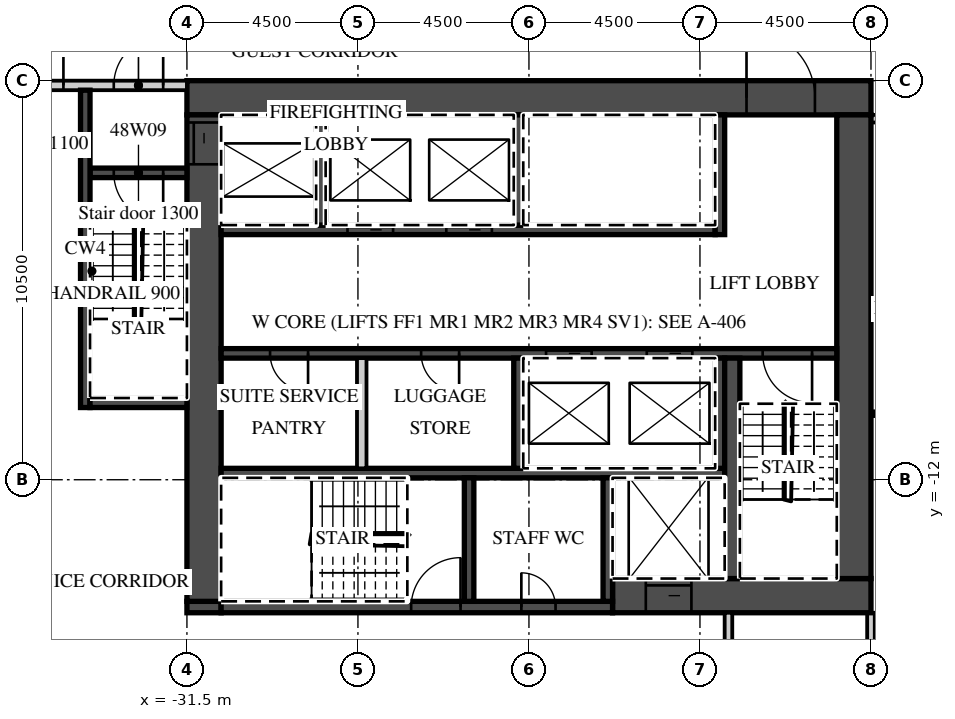
"""IFC4 building model, lengths in metres.
Left out: names, types, materials, properties, quantities, classifications, styles, units other than length and angle.
Written with IfcOpenShell. Run it as: python <this file> out.ifc"""

import sys

from ifc_helpers import new_model, si_unit, direction, frame, frame_2d, origin, place, context, subcontext, project, spatial, rectangle, extrude, element, fill, save


model = new_model("IFC4")
c1 = context("Model", 3, precision=1e-05, world=origin(), true_north=direction((0.0, 1.0)))
c2 = subcontext(c1, "Body", "Model", "MODEL_VIEW")
j1 = project(units=[si_unit("LENGTHUNIT", "METRE"), si_unit("PLANEANGLEUNIT", "RADIAN")], contexts=[c1])
p1 = place(None, origin())
s1 = spatial("IfcSite", under=j1, at=p1, CompositionType="ELEMENT")
p2 = place(p1, origin())
s2 = spatial("IfcBuilding", under=s1, at=p2, CompositionType="ELEMENT")
p3 = place(p2, frame((0.0, 0.0, 199.9)))
s3 = spatial("IfcBuildingStorey", under=s2, at=p3, CompositionType="ELEMENT", Elevation=199.9)
p4 = place(p3, frame((-13.5, -22.3, 0.0), z_axis=(0.0, 0.0, 1.0), x_axis=(0.0, 1.0, 0.0)))
e1 = element("IfcWall", 1, at=p4, inside=s3, PredefinedType="PARTITIONING", context=c2, shape_type="SweptSolid", body=[
    extrude(rectangle(XDim=6.8, YDim=0.2, at=frame_2d((3.4, 0.0))), origin(), (0.0, 0.0, 1.0), 3.02),
])
p5 = place(p3, frame((-13.5, -2.5, 0.0), z_axis=(0.0, 0.0, 1.0), x_axis=(1.0, 0.0, 0.0)))
e2 = element("IfcWall", 2, at=p5, inside=s3, PredefinedType="PARTITIONING", context=c2, shape_type="SweptSolid", body=[
    extrude(rectangle(XDim=27.0, YDim=0.2, at=frame_2d((13.5, 0.0))), origin(), (0.0, 0.0, 1.0), 3.02),
])
p6 = place(p5, frame((2.925, 0.0, 0.0)))
e3 = element("IfcOpeningElement", 3, at=p6, cuts=e2, PredefinedType="OPENING", context=c2, shape_type="SweptSolid", body=[
    extrude(rectangle(XDim=1.0, YDim=2.1, at=frame_2d((0.5, 1.05))), frame((0.0, 0.11, 0.0), z_axis=(0.0, -1.0, 0.0), x_axis=(1.0, 0.0, 0.0)), (0.0, 0.0, 1.0), 0.22),
])
p7 = place(p5, frame((5.075, 0.0, 0.0)))
e4 = element("IfcOpeningElement", 4, at=p7, cuts=e2, PredefinedType="OPENING", context=c2, shape_type="SweptSolid", body=[
    extrude(rectangle(XDim=1.0, YDim=2.1, at=frame_2d((0.5, 1.05))), frame((0.0, 0.11, 0.0), z_axis=(0.0, -1.0, 0.0), x_axis=(1.0, 0.0, 0.0)), (0.0, 0.0, 1.0), 0.22),
])
p8 = place(p5, frame((11.925, 0.0, 0.0)))
e5 = element("IfcOpeningElement", 5, at=p8, cuts=e2, PredefinedType="OPENING", context=c2, shape_type="SweptSolid", body=[
    extrude(rectangle(XDim=1.0, YDim=2.1, at=frame_2d((0.5, 1.05))), frame((0.0, 0.11, 0.0), z_axis=(0.0, -1.0, 0.0), x_axis=(1.0, 0.0, 0.0)), (0.0, 0.0, 1.0), 0.22),
])
p9 = place(p5, frame((15.938, 0.0, 0.0)))
e6 = element("IfcOpeningElement", 6, at=p9, cuts=e2, PredefinedType="OPENING", context=c2, shape_type="SweptSolid", body=[
    extrude(rectangle(XDim=1.2, YDim=2.1, at=frame_2d((0.6, 1.05))), frame((0.0, 0.11, 0.0), z_axis=(0.0, -1.0, 0.0), x_axis=(1.0, 0.0, 0.0)), (0.0, 0.0, 1.0), 0.22),
])
p10 = place(p5, frame((25.425, 0.0, 0.0)))
e7 = element("IfcOpeningElement", 7, at=p10, cuts=e2, PredefinedType="OPENING", context=c2, shape_type="SweptSolid", body=[
    extrude(rectangle(XDim=1.0, YDim=2.1, at=frame_2d((0.5, 1.05))), frame((0.0, 0.11, 0.0), z_axis=(0.0, -1.0, 0.0), x_axis=(1.0, 0.0, 0.0)), (0.0, 0.0, 1.0), 0.22),
])
p11 = place(p3, frame((-31.5, -1.95, 0.0), z_axis=(0.0, 0.0, 1.0), x_axis=(1.0, 0.0, 0.0)))
e8 = element("IfcWall", 8, at=p11, inside=s3, PredefinedType="SHEAR", context=c2, shape_type="SweptSolid", body=[
    extrude(rectangle(XDim=18.0, YDim=0.9, at=frame_2d((9.0, 0.0))), origin(), (0.0, 0.0, 1.0), 3.02),
])
p12 = place(p11, frame((14.725, 0.0, 0.0)))
e9 = element("IfcOpeningElement", 9, at=p12, cuts=e8, PredefinedType="OPENING", context=c2, shape_type="SweptSolid", body=[
    extrude(rectangle(XDim=1.8, YDim=2.1, at=frame_2d((0.9, 1.05))), frame((0.0, 0.46, 0.0), z_axis=(0.0, -1.0, 0.0), x_axis=(1.0, 0.0, 0.0)), (0.0, 0.0, 1.0), 0.92),
])
p13 = place(p3, frame((-20.3, -15.05, 0.0), z_axis=(0.0, 0.0, 1.0), x_axis=(1.0, 0.0, 0.0)))
e10 = element("IfcWall", 10, at=p13, inside=s3, PredefinedType="SHEAR", context=c2, shape_type="SweptSolid", body=[
    extrude(rectangle(XDim=6.8, YDim=0.9, at=frame_2d((3.4, 0.0))), origin(), (0.0, 0.0, 1.0), 3.02),
])
p14 = place(p13, frame((0.875, 0.0, 0.0)))
e11 = element("IfcOpeningElement", 11, at=p14, cuts=e10, PredefinedType="OPENING", context=c2, shape_type="SweptSolid", body=[
    extrude(rectangle(XDim=1.2, YDim=2.1, at=frame_2d((0.6, 1.05))), frame((0.0, 0.46, 0.0), z_axis=(0.0, -1.0, 0.0), x_axis=(1.0, 0.0, 0.0)), (0.0, 0.0, 1.0), 0.92),
])
p15 = place(p3, frame((-31.5, -15.35, 0.0), z_axis=(0.0, 0.0, 1.0), x_axis=(1.0, 0.0, 0.0)))
e12 = element("IfcWall", 12, at=p15, inside=s3, PredefinedType="SHEAR", context=c2, shape_type="SweptSolid", body=[
    extrude(rectangle(XDim=0.9, YDim=0.3, at=frame_2d((0.45, 0.0))), origin(), (0.0, 0.0, 1.0), 3.02),
])
p16 = place(p3, frame((-30.6, -15.35, 0.0), z_axis=(0.0, 0.0, 1.0), x_axis=(1.0, 0.0, 0.0)))
e13 = element("IfcWall", 13, at=p16, inside=s3, PredefinedType="SHEAR", context=c2, shape_type="SweptSolid", body=[
    extrude(rectangle(XDim=10.3, YDim=0.3, at=frame_2d((5.15, 0.0))), origin(), (0.0, 0.0, 1.0), 3.02),
])
p17 = place(p16, frame((5.0, 0.0, 0.0)))
e14 = element("IfcOpeningElement", 14, at=p17, cuts=e13, PredefinedType="OPENING", context=c2, shape_type="SweptSolid", body=[
    extrude(rectangle(XDim=1.3, YDim=2.1, at=frame_2d((0.65, 1.05))), frame((0.0, 0.16, 0.0), z_axis=(0.0, -1.0, 0.0), x_axis=(1.0, 0.0, 0.0)), (0.0, 0.0, 1.0), 0.32),
])
p18 = place(p16, frame((7.9, 0.0, 0.0)))
e15 = element("IfcOpeningElement", 15, at=p18, cuts=e13, PredefinedType="OPENING", context=c2, shape_type="SweptSolid", body=[
    extrude(rectangle(XDim=0.9, YDim=2.1, at=frame_2d((0.45, 1.05))), frame((0.0, 0.16, 0.0), z_axis=(0.0, -1.0, 0.0), x_axis=(1.0, 0.0, 0.0)), (0.0, 0.0, 1.0), 0.32),
])
p19 = place(p3, frame((-31.05, -15.2, 0.0), z_axis=(0.0, 0.0, 1.0), x_axis=(0.0, 1.0, 0.0)))
e16 = element("IfcWall", 16, at=p19, inside=s3, PredefinedType="SHEAR", context=c2, shape_type="SweptSolid", body=[
    extrude(rectangle(XDim=12.8, YDim=0.9, at=frame_2d((6.4, 0.0))), origin(), (0.0, 0.0, 1.0), 3.02),
])
p20 = place(p19, frame((11.5, 0.0, 0.0)))
e17 = element("IfcOpeningElement", 17, at=p20, cuts=e16, PredefinedType="OPENING", context=c2, shape_type="SweptSolid", body=[
    extrude(rectangle(XDim=1.1, YDim=2.1, at=frame_2d((0.55, 1.05))), frame((0.0, 0.46, 0.0), z_axis=(0.0, -1.0, 0.0), x_axis=(1.0, 0.0, 0.0)), (0.0, 0.0, 1.0), 0.92),
])
p21 = place(p3, frame((-13.95, -14.6, 0.0), z_axis=(0.0, 0.0, 1.0), x_axis=(0.0, 1.0, 0.0)))
e18 = element("IfcWall", 18, at=p21, inside=s3, PredefinedType="SHEAR", context=c2, shape_type="SweptSolid", body=[
    extrude(rectangle(XDim=12.2, YDim=0.9, at=frame_2d((6.1, 0.0))), origin(), (0.0, 0.0, 1.0), 3.02),
])
p22 = place(p3, frame((-30.6, -5.425, 0.0), z_axis=(0.0, 0.0, 1.0), x_axis=(1.0, 0.0, 0.0)))
e19 = element("IfcWall", 19, at=p22, inside=s3, PredefinedType="SHEAR", context=c2, shape_type="SweptSolid", body=[
    extrude(rectangle(XDim=13.0, YDim=0.25, at=frame_2d((6.5, 0.0))), origin(), (0.0, 0.0, 1.0), 3.02),
])
p23 = place(p22, frame((3.325, 0.0, 0.0)))
e20 = element("IfcOpeningElement", 20, at=p23, cuts=e19, PredefinedType="OPENING", context=c2, shape_type="SweptSolid", body=[
    extrude(rectangle(XDim=1.2, YDim=2.1, at=frame_2d((0.6, 1.05))), frame((0.0, 0.135, 0.0), z_axis=(0.0, -1.0, 0.0), x_axis=(1.0, 0.0, 0.0)), (0.0, 0.0, 1.0), 0.27),
])
p24 = place(p22, frame((5.925, 0.0, 0.0)))
e21 = element("IfcOpeningElement", 21, at=p24, cuts=e19, PredefinedType="OPENING", context=c2, shape_type="SweptSolid", body=[
    extrude(rectangle(XDim=1.2, YDim=2.1, at=frame_2d((0.6, 1.05))), frame((0.0, 0.135, 0.0), z_axis=(0.0, -1.0, 0.0), x_axis=(1.0, 0.0, 0.0)), (0.0, 0.0, 1.0), 0.27),
])
p25 = place(p3, frame((-17.475, -5.55, 0.0), z_axis=(0.0, 0.0, 1.0), x_axis=(0.0, 1.0, 0.0)))
e22 = element("IfcWall", 22, at=p25, inside=s3, PredefinedType="SHEAR", context=c2, shape_type="SweptSolid", body=[
    extrude(rectangle(XDim=3.15, YDim=0.25, at=frame_2d((1.575, 0.0))), origin(), (0.0, 0.0, 1.0), 3.02),
])
for number, where, z_axis, x_axis in (
    (23, (-27.975, -5.3, 0.0), (0.0, 0.0, 1.0), (0.0, 1.0, 0.0)),
    (24, (-22.775, -5.3, 0.0), (0.0, 0.0, 1.0), (0.0, 1.0, 0.0)),
):
    element("IfcWall", number, at=place(p3, frame(where, z_axis=z_axis, x_axis=x_axis)), inside=s3, PredefinedType="SHEAR", context=c2, shape_type="SweptSolid", body=[
        extrude(rectangle(XDim=2.9, YDim=0.25, at=frame_2d((1.45, 0.0))), origin(), (0.0, 0.0, 1.0), 3.02),
    ])
p26 = place(p3, frame((-30.6, -8.675, 0.0), z_axis=(0.0, 0.0, 1.0), x_axis=(1.0, 0.0, 0.0)))
e25 = element("IfcWall", 25, at=p26, inside=s3, PredefinedType="SHEAR", context=c2, shape_type="SweptSolid", body=[
    extrude(rectangle(XDim=16.2, YDim=0.25, at=frame_2d((8.1, 0.0))), origin(), (0.0, 0.0, 1.0), 3.02),
])
p27 = place(p26, frame((8.55, 0.0, 0.0)))
e26 = element("IfcOpeningElement", 26, at=p27, cuts=e25, PredefinedType="OPENING", context=c2, shape_type="SweptSolid", body=[
    extrude(rectangle(XDim=1.2, YDim=2.1, at=frame_2d((0.6, 1.05))), frame((0.0, 0.135, 0.0), z_axis=(0.0, -1.0, 0.0), x_axis=(1.0, 0.0, 0.0)), (0.0, 0.0, 1.0), 0.27),
])
p28 = place(p26, frame((11.2, 0.0, 0.0)))
e27 = element("IfcOpeningElement", 27, at=p28, cuts=e25, PredefinedType="OPENING", context=c2, shape_type="SweptSolid", body=[
    extrude(rectangle(XDim=1.2, YDim=2.1, at=frame_2d((0.6, 1.05))), frame((0.0, 0.135, 0.0), z_axis=(0.0, -1.0, 0.0), x_axis=(1.0, 0.0, 0.0)), (0.0, 0.0, 1.0), 0.27),
])
p29 = place(p26, frame((14.25, 0.0, 0.0)))
e28 = element("IfcOpeningElement", 28, at=p29, cuts=e25, PredefinedType="OPENING", context=c2, shape_type="SweptSolid", body=[
    extrude(rectangle(XDim=1.3, YDim=2.1, at=frame_2d((0.65, 1.05))), frame((0.0, 0.135, 0.0), z_axis=(0.0, -1.0, 0.0), x_axis=(1.0, 0.0, 0.0)), (0.0, 0.0, 1.0), 0.27),
])
p30 = place(p26, frame((1.288, 0.0, 0.0)))
e29 = element("IfcOpeningElement", 29, at=p30, cuts=e25, PredefinedType="OPENING", context=c2, shape_type="SweptSolid", body=[
    extrude(rectangle(XDim=1.0, YDim=2.1, at=frame_2d((0.5, 1.05))), frame((0.0, 0.135, 0.0), z_axis=(0.0, -1.0, 0.0), x_axis=(1.0, 0.0, 0.0)), (0.0, 0.0, 1.0), 0.27),
])
p31 = place(p26, frame((5.262, 0.0, 0.0)))
e30 = element("IfcOpeningElement", 30, at=p31, cuts=e25, PredefinedType="OPENING", context=c2, shape_type="SweptSolid", body=[
    extrude(rectangle(XDim=1.0, YDim=2.1, at=frame_2d((0.5, 1.05))), frame((0.0, 0.135, 0.0), z_axis=(0.0, -1.0, 0.0), x_axis=(1.0, 0.0, 0.0)), (0.0, 0.0, 1.0), 0.27),
])
p32 = place(p3, frame((-30.6, -11.825, 0.0), z_axis=(0.0, 0.0, 1.0), x_axis=(1.0, 0.0, 0.0)))
e31 = element("IfcWall", 31, at=p32, inside=s3, PredefinedType="SHEAR", context=c2, shape_type="SweptSolid", body=[
    extrude(rectangle(XDim=13.25, YDim=0.25, at=frame_2d((6.625, 0.0))), origin(), (0.0, 0.0, 1.0), 3.02),
])
for number, where, z_axis, x_axis in (
    (32, (-17.475, -11.7, 0.0), (0.0, 0.0, 1.0), (0.0, 1.0, 0.0)),
    (33, (-22.775, -11.7, 0.0), (0.0, 0.0, 1.0), (0.0, 1.0, 0.0)),
):
    element("IfcWall", number, at=place(p3, frame(where, z_axis=z_axis, x_axis=x_axis)), inside=s3, PredefinedType="SHEAR", context=c2, shape_type="SweptSolid", body=[
        extrude(rectangle(XDim=2.9, YDim=0.25, at=frame_2d((1.45, 0.0))), origin(), (0.0, 0.0, 1.0), 3.02),
    ])
p33 = place(p3, frame((-26.9, -11.7, 0.0), z_axis=(0.0, 0.0, 1.0), x_axis=(0.0, 1.0, 0.0)))
e34 = element("IfcWall", 34, at=p33, inside=s3, PredefinedType="PARTITIONING", context=c2, shape_type="SweptSolid", body=[
    extrude(rectangle(XDim=2.9, YDim=0.25, at=frame_2d((1.45, 0.0))), origin(), (0.0, 0.0, 1.0), 3.02),
])
p34 = place(p3, frame((-17.15, -14.6, 0.0), z_axis=(0.0, 0.0, 1.0), x_axis=(0.0, 1.0, 0.0)))
e35 = element("IfcWall", 35, at=p34, inside=s3, PredefinedType="SHEAR", context=c2, shape_type="SweptSolid", body=[
    extrude(rectangle(XDim=5.8, YDim=0.4, at=frame_2d((2.9, 0.0))), origin(), (0.0, 0.0, 1.0), 3.02),
])
for number, where, z_axis, x_axis in (
    (36, (-20.425, -15.2, 0.0), (0.0, 0.0, 1.0), (0.0, 1.0, 0.0)),
    (37, (-24.075, -15.2, 0.0), (0.0, 0.0, 1.0), (0.0, 1.0, 0.0)),
):
    element("IfcWall", number, at=place(p3, frame(where, z_axis=z_axis, x_axis=x_axis)), inside=s3, PredefinedType="SHEAR", context=c2, shape_type="SweptSolid", body=[
        extrude(rectangle(XDim=3.25, YDim=0.25, at=frame_2d((1.625, 0.0))), origin(), (0.0, 0.0, 1.0), 3.02),
    ])
p35 = place(p3, frame((-42.632, -1.625, 0.0), z_axis=(0.0, 0.0, 1.0), x_axis=(1.0, 0.0, 0.0)))
e38 = element("IfcWall", 38, at=p35, inside=s3, PredefinedType="PARTITIONING", context=c2, shape_type="SweptSolid", body=[
    extrude(rectangle(XDim=11.132, YDim=0.25, at=frame_2d((5.566, 0.0))), origin(), (0.0, 0.0, 1.0), 3.02),
])
p36 = place(p35, frame((9.207, 0.0, 0.0)))
e39 = element("IfcOpeningElement", 39, at=p36, cuts=e38, PredefinedType="OPENING", context=c2, shape_type="SweptSolid", body=[
    extrude(rectangle(XDim=1.3, YDim=2.1, at=frame_2d((0.65, 1.05))), frame((0.0, 0.135, 0.0), z_axis=(0.0, -1.0, 0.0), x_axis=(1.0, 0.0, 0.0)), (0.0, 0.0, 1.0), 0.27),
])
p37 = place(p35, frame((6.781, 0.0, 0.0)))
e40 = element("IfcOpeningElement", 40, at=p37, cuts=e38, PredefinedType="OPENING", context=c2, shape_type="SweptSolid", body=[
    extrude(rectangle(XDim=1.1, YDim=2.1, at=frame_2d((0.55, 1.05))), frame((0.0, 0.135, 0.0), z_axis=(0.0, -1.0, 0.0), x_axis=(1.0, 0.0, 0.0)), (0.0, 0.0, 1.0), 0.27),
])
p38 = place(p3, frame((-34.05, -3.925, 0.0), z_axis=(0.0, 0.0, 1.0), x_axis=(1.0, 0.0, 0.0)))
e41 = element("IfcWall", 41, at=p38, inside=s3, PredefinedType="SHEAR", context=c2, shape_type="SweptSolid", body=[
    extrude(rectangle(XDim=2.55, YDim=0.25, at=frame_2d((1.275, 0.0))), origin(), (0.0, 0.0, 1.0), 3.02),
])
p39 = place(p38, frame((0.625, 0.0, 0.0)))
e42 = element("IfcOpeningElement", 42, at=p39, cuts=e41, PredefinedType="OPENING", context=c2, shape_type="SweptSolid", body=[
    extrude(rectangle(XDim=1.3, YDim=2.1, at=frame_2d((0.65, 1.05))), frame((0.0, 0.135, 0.0), z_axis=(0.0, -1.0, 0.0), x_axis=(1.0, 0.0, 0.0)), (0.0, 0.0, 1.0), 0.27),
])
p40 = place(p3, frame((-34.175, -10.1, 0.0), z_axis=(0.0, 0.0, 1.0), x_axis=(0.0, 1.0, 0.0)))
e43 = element("IfcWall", 43, at=p40, inside=s3, PredefinedType="SHEAR", context=c2, shape_type="SweptSolid", body=[
    extrude(rectangle(XDim=8.35, YDim=0.25, at=frame_2d((4.175, 0.0))), origin(), (0.0, 0.0, 1.0), 3.02),
])
p41 = place(p3, frame((-34.05, -9.975, 0.0), z_axis=(0.0, 0.0, 1.0), x_axis=(1.0, 0.0, 0.0)))
e44 = element("IfcWall", 44, at=p41, inside=s3, PredefinedType="SHEAR", context=c2, shape_type="SweptSolid", body=[
    extrude(rectangle(XDim=2.55, YDim=0.25, at=frame_2d((1.275, 0.0))), origin(), (0.0, 0.0, 1.0), 3.02),
])
p42 = place(p3, frame((-17.25, -17.7, 0.0), z_axis=(0.0, 0.0, 1.0), x_axis=(0.0, 1.0, 0.0)))
e45 = element("IfcWall", 45, at=p42, inside=s3, PredefinedType="PARTITIONING", context=c2, shape_type="SweptSolid", body=[
    extrude(rectangle(XDim=2.2, YDim=0.2, at=frame_2d((1.1, 0.0))), origin(), (0.0, 0.0, 1.0), 3.02),
])
p43 = place(p27, origin())
e46 = element("IfcDoor", 46, at=p43, inside=s3, OperationType="SLIDING_TO_LEFT", PredefinedType="DOOR", context=c2, shape_type="SweptSolid", body=[
    extrude(rectangle(XDim=1.2, YDim=2.1, at=frame_2d((0.6, 1.05))), frame((0.0, 0.025, 0.0), z_axis=(0.0, -1.0, 0.0), x_axis=(1.0, 0.0, 0.0)), (0.0, 0.0, 1.0), 0.05),
])
fill(e26, e46)
p44 = place(p28, origin())
e47 = element("IfcDoor", 47, at=p44, inside=s3, OperationType="SLIDING_TO_RIGHT", PredefinedType="DOOR", context=c2, shape_type="SweptSolid", body=[
    extrude(rectangle(XDim=1.2, YDim=2.1, at=frame_2d((0.6, 1.05))), frame((0.0, 0.025, 0.0), z_axis=(0.0, -1.0, 0.0), x_axis=(1.0, 0.0, 0.0)), (0.0, 0.0, 1.0), 0.05),
])
fill(e27, e47)
p45 = place(p23, origin())
e48 = element("IfcDoor", 48, at=p45, inside=s3, OperationType="SLIDING_TO_RIGHT", PredefinedType="DOOR", context=c2, shape_type="SweptSolid", body=[
    extrude(rectangle(XDim=1.2, YDim=2.1, at=frame_2d((0.6, 1.05))), frame((0.0, 0.025, 0.0), z_axis=(0.0, -1.0, 0.0), x_axis=(1.0, 0.0, 0.0)), (0.0, 0.0, 1.0), 0.05),
])
fill(e20, e48)
p46 = place(p24, origin())
e49 = element("IfcDoor", 49, at=p46, inside=s3, OperationType="SLIDING_TO_RIGHT", PredefinedType="DOOR", context=c2, shape_type="SweptSolid", body=[
    extrude(rectangle(XDim=1.2, YDim=2.1, at=frame_2d((0.6, 1.05))), frame((0.0, 0.025, 0.0), z_axis=(0.0, -1.0, 0.0), x_axis=(1.0, 0.0, 0.0)), (0.0, 0.0, 1.0), 0.05),
])
fill(e21, e49)
p47 = place(p14, origin())
e50 = element("IfcDoor", 50, at=p47, inside=s3, OperationType="SLIDING_TO_LEFT", PredefinedType="DOOR", context=c2, shape_type="SweptSolid", body=[
    extrude(rectangle(XDim=1.2, YDim=2.1, at=frame_2d((0.6, 1.05))), frame((0.0, 0.025, 0.0), z_axis=(0.0, -1.0, 0.0), x_axis=(1.0, 0.0, 0.0)), (0.0, 0.0, 1.0), 0.05),
])
fill(e11, e50)
p48 = place(p20, origin())
e51 = element("IfcDoor", 51, at=p48, inside=s3, OperationType="SLIDING_TO_RIGHT", PredefinedType="DOOR", context=c2, shape_type="SweptSolid", body=[
    extrude(rectangle(XDim=1.1, YDim=2.1, at=frame_2d((0.55, 1.05))), frame((0.0, 0.025, 0.0), z_axis=(0.0, -1.0, 0.0), x_axis=(1.0, 0.0, 0.0)), (0.0, 0.0, 1.0), 0.05),
])
fill(e17, e51)
p49 = place(p12, origin())
e52 = element("IfcDoor", 52, at=p49, inside=s3, OperationType="DOUBLE_DOOR_DOUBLE_SWING", PredefinedType="DOOR", context=c2, shape_type="SweptSolid", body=[
    extrude(rectangle(XDim=1.8, YDim=2.1, at=frame_2d((0.9, 1.05))), frame((0.0, 0.025, 0.0), z_axis=(0.0, -1.0, 0.0), x_axis=(1.0, 0.0, 0.0)), (0.0, 0.0, 1.0), 0.05),
])
fill(e9, e52)
p50 = place(p36, origin())
e53 = element("IfcDoor", 53, at=p50, inside=s3, OperationType="SINGLE_SWING_RIGHT", PredefinedType="DOOR", context=c2, shape_type="SweptSolid", body=[
    extrude(rectangle(XDim=1.3, YDim=2.1, at=frame_2d((0.65, 1.05))), frame((0.0, 0.025, 0.0), z_axis=(0.0, -1.0, 0.0), x_axis=(1.0, 0.0, 0.0)), (0.0, 0.0, 1.0), 0.05),
])
fill(e39, e53)
p51 = place(p39, origin())
e54 = element("IfcDoor", 54, at=p51, inside=s3, OperationType="SINGLE_SWING_RIGHT", PredefinedType="DOOR", context=c2, shape_type="SweptSolid", body=[
    extrude(rectangle(XDim=1.3, YDim=2.1, at=frame_2d((0.65, 1.05))), frame((0.0, 0.025, 0.0), z_axis=(0.0, -1.0, 0.0), x_axis=(1.0, 0.0, 0.0)), (0.0, 0.0, 1.0), 0.05),
])
fill(e42, e54)
p52 = place(p37, origin())
e55 = element("IfcDoor", 55, at=p52, inside=s3, OperationType="SINGLE_SWING_RIGHT", PredefinedType="DOOR", context=c2, shape_type="SweptSolid", body=[
    extrude(rectangle(XDim=1.1, YDim=2.1, at=frame_2d((0.55, 1.05))), frame((0.0, 0.025, 0.0), z_axis=(0.0, -1.0, 0.0), x_axis=(1.0, 0.0, 0.0)), (0.0, 0.0, 1.0), 0.05),
])
fill(e40, e55)
p53 = place(p29, origin())
e56 = element("IfcDoor", 56, at=p53, inside=s3, OperationType="SINGLE_SWING_RIGHT", PredefinedType="DOOR", context=c2, shape_type="SweptSolid", body=[
    extrude(rectangle(XDim=1.3, YDim=2.1, at=frame_2d((0.65, 1.05))), frame((0.0, 0.025, 0.0), z_axis=(0.0, -1.0, 0.0), x_axis=(1.0, 0.0, 0.0)), (0.0, 0.0, 1.0), 0.05),
])
fill(e28, e56)
p54 = place(p17, origin())
e57 = element("IfcDoor", 57, at=p54, inside=s3, OperationType="SINGLE_SWING_RIGHT", PredefinedType="DOOR", context=c2, shape_type="SweptSolid", body=[
    extrude(rectangle(XDim=1.3, YDim=2.1, at=frame_2d((0.65, 1.05))), frame((0.0, 0.025, 0.0), z_axis=(0.0, -1.0, 0.0), x_axis=(1.0, 0.0, 0.0)), (0.0, 0.0, 1.0), 0.05),
])
fill(e14, e57)
p55 = place(p18, origin())
e58 = element("IfcDoor", 58, at=p55, inside=s3, OperationType="SINGLE_SWING_LEFT", PredefinedType="DOOR", context=c2, shape_type="SweptSolid", body=[
    extrude(rectangle(XDim=0.9, YDim=2.1, at=frame_2d((0.45, 1.05))), frame((0.0, 0.025, 0.0), z_axis=(0.0, -1.0, 0.0), x_axis=(1.0, 0.0, 0.0)), (0.0, 0.0, 1.0), 0.05),
])
fill(e15, e58)
p56 = place(p30, origin())
e59 = element("IfcDoor", 59, at=p56, inside=s3, OperationType="SINGLE_SWING_RIGHT", PredefinedType="DOOR", context=c2, shape_type="SweptSolid", body=[
    extrude(rectangle(XDim=1.0, YDim=2.1, at=frame_2d((0.5, 1.05))), frame((0.0, 0.025, 0.0), z_axis=(0.0, -1.0, 0.0), x_axis=(1.0, 0.0, 0.0)), (0.0, 0.0, 1.0), 0.05),
])
fill(e29, e59)
p57 = place(p31, origin())
e60 = element("IfcDoor", 60, at=p57, inside=s3, OperationType="SINGLE_SWING_RIGHT", PredefinedType="DOOR", context=c2, shape_type="SweptSolid", body=[
    extrude(rectangle(XDim=1.0, YDim=2.1, at=frame_2d((0.5, 1.05))), frame((0.0, 0.025, 0.0), z_axis=(0.0, -1.0, 0.0), x_axis=(1.0, 0.0, 0.0)), (0.0, 0.0, 1.0), 0.05),
])
fill(e30, e60)
save(model, sys.argv[1])
